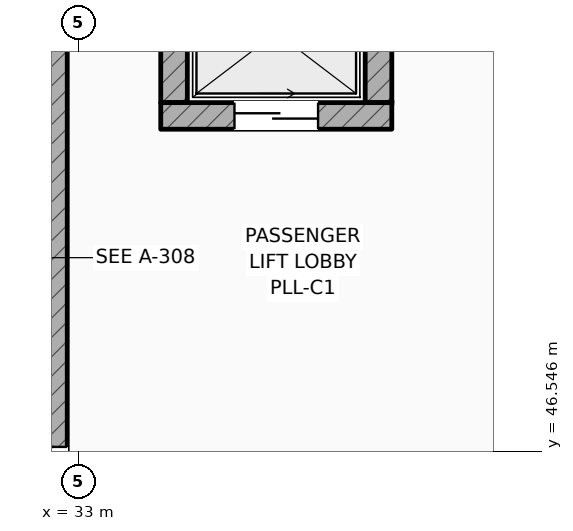
"""IFC4 building model, lengths in metres.
Left out: names, types, materials, properties, quantities, classifications, styles, units other than length and angle.
Written with IfcOpenShell. Run it as: python <this file> out.ifc"""

import sys

from ifc_helpers import new_model, si_unit, direction, frame, frame_2d, origin, place, context, subcontext, project, spatial, rectangle, extrude, element, fill, save


model = new_model("IFC4")
c1 = context("Model", 3, precision=1e-05, world=origin(), true_north=direction((0.0, 1.0)))
c2 = subcontext(c1, "Body", "Model", "MODEL_VIEW")
j1 = project(units=[si_unit("LENGTHUNIT", "METRE"), si_unit("PLANEANGLEUNIT", "RADIAN")], contexts=[c1])
p1 = place(None, origin())
s1 = spatial("IfcSite", under=j1, at=p1, CompositionType="ELEMENT")
p2 = place(p1, origin())
s2 = spatial("IfcBuilding", under=s1, at=p2, CompositionType="ELEMENT")
p3 = place(p2, origin())
s3 = spatial("IfcBuildingStorey", under=s2, at=p3, CompositionType="ELEMENT", Elevation=0.0)
p4 = place(p3, frame((32.675, 44.75, 0.0), z_axis=(0.0, 0.0, 1.0), x_axis=(0.0, 1.0, 0.0)))
e1 = element("IfcWall", 1, at=p4, inside=s3, PredefinedType="SHEAR", context=c2, shape_type="SweptSolid", body=[
    extrude(rectangle(XDim=8.68, YDim=0.35, at=frame_2d((4.34, 0.0))), origin(), (0.0, 0.0, 1.0), 6.0),
])
p5 = place(p4, frame((0.25, 0.0, 0.0)))
e2 = element("IfcOpeningElement", 2, at=p5, cuts=e1, PredefinedType="OPENING", context=c2, shape_type="SweptSolid", body=[
    extrude(rectangle(XDim=1.6, YDim=2.2, at=frame_2d((0.8, 1.1))), frame((0.0, 0.185, 0.0), z_axis=(0.0, -1.0, 0.0), x_axis=(1.0, 0.0, 0.0)), (0.0, 0.0, 1.0), 0.37),
])
p6 = place(p3, frame((34.08, 50.955, 0.0), z_axis=(0.0, 0.0, 1.0), x_axis=(1.0, 0.0, 0.0)))
e3 = element("IfcWall", 3, at=p6, inside=s3, PredefinedType="SHEAR", context=c2, shape_type="SweptSolid", body=[
    extrude(rectangle(XDim=3.04, YDim=0.35, at=frame_2d((1.52, 0.0))), origin(), (0.0, 0.0, 1.0), 5.7),
])
p7 = place(p6, frame((0.97, 0.0, 0.0)))
e4 = element("IfcOpeningElement", 4, at=p7, cuts=e3, PredefinedType="OPENING", context=c2, shape_type="SweptSolid", body=[
    extrude(rectangle(XDim=1.1, YDim=2.2, at=frame_2d((0.55, 1.1))), frame((0.0, 0.185, 0.0), z_axis=(0.0, -1.0, 0.0), x_axis=(1.0, 0.0, 0.0)), (0.0, 0.0, 1.0), 0.37),
])
for number, where, z_axis, x_axis in (
    (5, (34.255, 51.13, 0.0), (0.0, 0.0, 1.0), (0.0, 1.0, 0.0)),
    (6, (36.945, 51.13, 0.0), (0.0, 0.0, 1.0), (0.0, 1.0, 0.0)),
):
    element("IfcWall", number, at=place(p3, frame(where, z_axis=z_axis, x_axis=x_axis)), inside=s3, PredefinedType="SHEAR", context=c2, shape_type="SweptSolid", body=[
        extrude(rectangle(XDim=1.84, YDim=0.35, at=frame_2d((0.92, 0.0))), origin(), (0.0, 0.0, 1.0), 5.7),
    ])
p8 = place(p5, origin())
e7 = element("IfcDoor", 7, at=p8, inside=s3, OperationType="SINGLE_SWING_RIGHT", PredefinedType="DOOR", context=c2, shape_type="SweptSolid", body=[
    extrude(rectangle(XDim=1.6, YDim=2.2, at=frame_2d((0.8, 1.1))), frame((0.0, 0.025, 0.0), z_axis=(0.0, -1.0, 0.0), x_axis=(1.0, 0.0, 0.0)), (0.0, 0.0, 1.0), 0.05),
])
fill(e2, e7)
p9 = place(p7, origin())
e8 = element("IfcDoor", 8, at=p9, inside=s3, OperationType="SLIDING_TO_LEFT", PredefinedType="DOOR", context=c2, shape_type="SweptSolid", body=[
    extrude(rectangle(XDim=1.1, YDim=2.2, at=frame_2d((0.55, 1.1))), frame((0.0, 0.025, 0.0), z_axis=(0.0, -1.0, 0.0), x_axis=(1.0, 0.0, 0.0)), (0.0, 0.0, 1.0), 0.05),
])
fill(e4, e8)
save(model, sys.argv[1])
